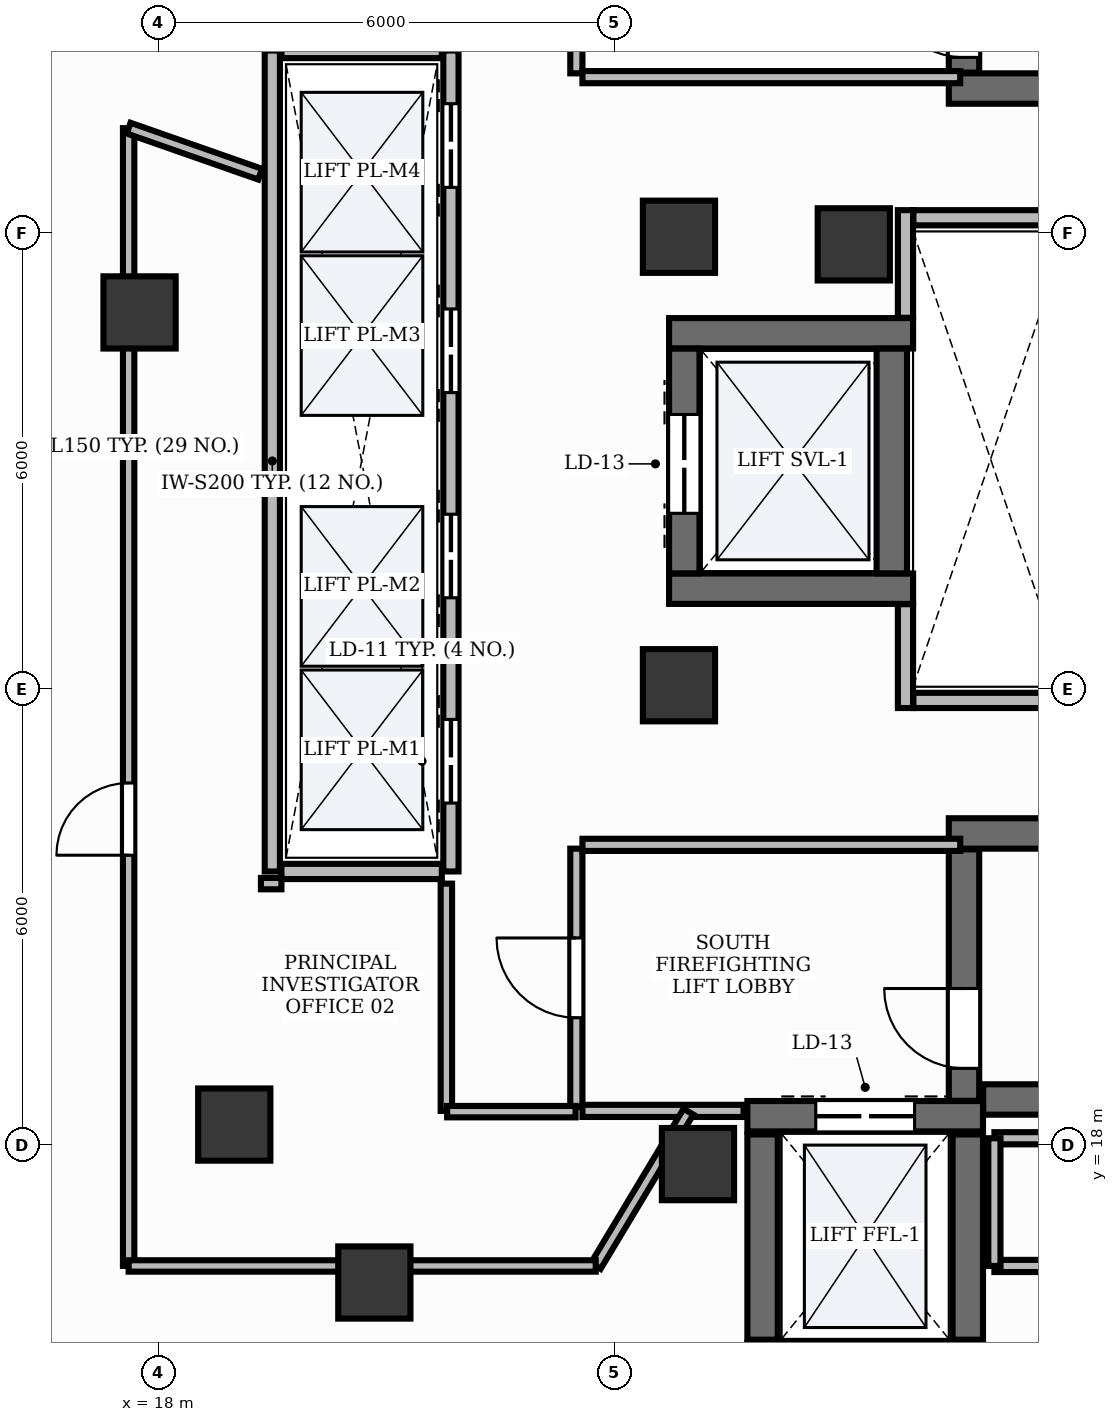
"""IFC4 building model, lengths in metres.
Left out: names, types, materials, properties, quantities, classifications, styles, units other than length and angle.
Written with IfcOpenShell. Run it as: python <this file> out.ifc"""

import sys

from ifc_helpers import new_model, si_unit, direction, frame, frame_2d, origin, origin_2d, place, context, subcontext, project, spatial, rectangle, extrude, element, fill, save


model = new_model("IFC4")
c1 = context("Model", 3, precision=1e-05, world=origin(), true_north=direction((0.0, 1.0)))
c2 = subcontext(c1, "Body", "Model", "MODEL_VIEW")
j1 = project(units=[si_unit("LENGTHUNIT", "METRE"), si_unit("PLANEANGLEUNIT", "RADIAN")], contexts=[c1])
p1 = place(None, origin())
s1 = spatial("IfcSite", under=j1, at=p1, CompositionType="ELEMENT")
p2 = place(p1, origin())
s2 = spatial("IfcBuilding", under=s1, at=p2, CompositionType="ELEMENT")
p3 = place(p2, frame((0.0, 0.0, 196.2)))
s3 = spatial("IfcBuildingStorey", under=s2, at=p3, CompositionType="ELEMENT", Elevation=196.2)
p4 = place(p3, frame((28.4, 31.9, 0.0), z_axis=(0.0, 0.0, 1.0), x_axis=(1.0, 0.0, 0.0)))
e1 = element("IfcWall", 1, at=p4, inside=s3, PredefinedType="SHEAR", context=c2, shape_type="SweptSolid", body=[
    extrude(rectangle(XDim=8.65, YDim=0.4, at=frame_2d((4.325, 0.0))), origin(), (0.0, 0.0, 1.0), 3.9),
])
p5 = place(p3, frame((28.6, 32.11, 0.0), z_axis=(0.0, 0.0, 1.0), x_axis=(0.0, 1.0, 0.0)))
e2 = element("IfcWall", 2, at=p5, inside=s3, PredefinedType="SHEAR", context=c2, shape_type="SweptSolid", body=[
    extrude(rectangle(XDim=3.308, YDim=0.4, at=frame_2d((1.654, 0.0))), origin(), (0.0, 0.0, 1.0), 3.9),
])
p6 = place(p5, frame((0.2, 0.0, 0.0)))
e3 = element("IfcOpeningElement", 3, at=p6, cuts=e2, PredefinedType="OPENING", context=c2, shape_type="SweptSolid", body=[
    extrude(rectangle(XDim=1.05, YDim=2.15, at=frame_2d((0.525, 1.075))), frame((0.0, 0.215, 0.0), z_axis=(0.0, -1.0, 0.0), x_axis=(1.0, 0.0, 0.0)), (0.0, 0.0, 1.0), 0.43),
])
p7 = place(p3, frame((28.852, 18.6, 0.0), z_axis=(0.0, 0.0, 1.0), x_axis=(1.0, 0.0, 0.0)))
e4 = element("IfcWall", 4, at=p7, inside=s3, PredefinedType="SHEAR", context=c2, shape_type="SweptSolid", body=[
    extrude(rectangle(XDim=8.198, YDim=0.4, at=frame_2d((4.099, 0.0))), origin(), (0.0, 0.0, 1.0), 3.9),
])
p8 = place(p3, frame((28.4, 22.1, 0.0), z_axis=(0.0, 0.0, 1.0), x_axis=(1.0, 0.0, 0.0)))
e5 = element("IfcWall", 5, at=p8, inside=s3, PredefinedType="SHEAR", context=c2, shape_type="SweptSolid", body=[
    extrude(rectangle(XDim=8.65, YDim=0.4, at=frame_2d((4.325, 0.0))), origin(), (0.0, 0.0, 1.0), 3.9),
])
p9 = place(p3, frame((28.6, 18.582, 0.0), z_axis=(0.0, 0.0, 1.0), x_axis=(0.0, 1.0, 0.0)))
e6 = element("IfcWall", 6, at=p9, inside=s3, PredefinedType="SHEAR", context=c2, shape_type="SweptSolid", body=[
    extrude(rectangle(XDim=3.308, YDim=0.4, at=frame_2d((1.654, 0.0))), origin(), (0.0, 0.0, 1.0), 3.9),
])
p10 = place(p9, frame((0.428, 0.0, 0.0)))
e7 = element("IfcOpeningElement", 7, at=p10, cuts=e6, PredefinedType="OPENING", context=c2, shape_type="SweptSolid", body=[
    extrude(rectangle(XDim=1.05, YDim=2.15, at=frame_2d((0.525, 1.075))), frame((0.0, 0.215, 0.0), z_axis=(0.0, -1.0, 0.0), x_axis=(1.0, 0.0, 0.0)), (0.0, 0.0, 1.0), 0.43),
])
p11 = place(p3, frame((25.75, 18.38, 0.0), z_axis=(0.0, 0.0, 1.0), x_axis=(1.0, 0.0, 0.0)))
e8 = element("IfcWall", 8, at=p11, inside=s3, PredefinedType="SHEAR", context=c2, shape_type="SweptSolid", body=[
    extrude(rectangle(XDim=3.1, YDim=0.4, at=frame_2d((1.55, 0.0))), origin(), (0.0, 0.0, 1.0), 3.9),
])
p12 = place(p11, frame((0.9, 0.0, 0.0)))
e9 = element("IfcOpeningElement", 9, at=p12, cuts=e8, PredefinedType="OPENING", context=c2, shape_type="SweptSolid", body=[
    extrude(rectangle(XDim=1.3, YDim=2.2, at=frame_2d((0.65, 1.1))), frame((0.0, 0.215, 0.0), z_axis=(0.0, -1.0, 0.0), x_axis=(1.0, 0.0, 0.0)), (0.0, 0.0, 1.0), 0.43),
])
for number, where, z_axis, x_axis in (
    (10, (25.95, 15.44, 0.0), (0.0, 0.0, 1.0), (0.0, 1.0, 0.0)),
    (11, (28.65, 15.44, 0.0), (0.0, 0.0, 1.0), (0.0, 1.0, 0.0)),
):
    element("IfcWall", number, at=place(p3, frame(where, z_axis=z_axis, x_axis=x_axis)), inside=s3, PredefinedType="SHEAR", context=c2, shape_type="SweptSolid", body=[
        extrude(rectangle(XDim=2.7, YDim=0.4, at=frame_2d((1.35, 0.0))), origin(), (0.0, 0.0, 1.0), 3.9),
    ])
for number, where, z_axis, x_axis in (
    (12, (24.72, 28.68, 0.0), (0.0, 0.0, 1.0), (1.0, 0.0, 0.0)),
    (13, (24.72, 25.32, 0.0), (0.0, 0.0, 1.0), (1.0, 0.0, 0.0)),
):
    element("IfcWall", number, at=place(p3, frame(where, z_axis=z_axis, x_axis=x_axis)), inside=s3, PredefinedType="SHEAR", context=c2, shape_type="SweptSolid", body=[
        extrude(rectangle(XDim=3.21, YDim=0.4, at=frame_2d((1.605, 0.0))), origin(), (0.0, 0.0, 1.0), 3.9),
    ])
p13 = place(p3, frame((24.92, 25.522, 0.0), z_axis=(0.0, 0.0, 1.0), x_axis=(0.0, 1.0, 0.0)))
e14 = element("IfcWall", 14, at=p13, inside=s3, PredefinedType="SHEAR", context=c2, shape_type="SweptSolid", body=[
    extrude(rectangle(XDim=2.956, YDim=0.4, at=frame_2d((1.478, 0.0))), origin(), (0.0, 0.0, 1.0), 3.9),
])
p14 = place(p13, frame((0.79, 0.0, 0.0)))
e15 = element("IfcOpeningElement", 15, at=p14, cuts=e14, PredefinedType="OPENING", context=c2, shape_type="SweptSolid", body=[
    extrude(rectangle(XDim=1.3, YDim=2.2, at=frame_2d((0.65, 1.1))), frame((0.0, 0.215, 0.0), z_axis=(0.0, -1.0, 0.0), x_axis=(1.0, 0.0, 0.0)), (0.0, 0.0, 1.0), 0.43),
])
p15 = place(p3, frame((27.65, 25.522, 0.0), z_axis=(0.0, 0.0, 1.0), x_axis=(0.0, 1.0, 0.0)))
e16 = element("IfcWall", 16, at=p15, inside=s3, PredefinedType="SHEAR", context=c2, shape_type="SweptSolid", body=[
    extrude(rectangle(XDim=2.956, YDim=0.4, at=frame_2d((1.478, 0.0))), origin(), (0.0, 0.0, 1.0), 3.9),
])
for number, where, z_axis, x_axis in (
    (17, (24.85, 29.95, -0.0), (0.0, 0.0, 1.0), (1.0, 0.0, 0.0)),
    (18, (27.15, 29.85, -0.0), (0.0, 0.0, 1.0), (1.0, 0.0, 0.0)),
    (19, (24.85, 24.05, -0.0), (0.0, 0.0, 1.0), (1.0, 0.0, 0.0)),
    (20, (25.1, 17.75, -0.0), (0.0, 0.0, 1.0), (1.0, 0.0, 0.0)),
):
    element("IfcColumn", number, at=place(p3, frame(where, z_axis=z_axis, x_axis=x_axis)), inside=s3, PredefinedType="PILASTER", context=c2, shape_type="SweptSolid", body=[
        extrude(rectangle(XDim=0.95, YDim=0.95, at=origin_2d()), origin(), (0.0, 0.0, 1.0), 3.901),
    ])
for number, where, z_axis, x_axis in (
    (21, (17.753, 28.955, -0.0), (0.0, 0.0, 1.0), (1.0, 0.0, 0.0)),
    (22, (19.0, 18.27, -0.0), (0.0, 0.0, 1.0), (1.0, 0.0, 0.0)),
    (23, (20.842, 16.192, -0.0), (0.0, 0.0, 1.0), (1.0, 0.0, 0.0)),
):
    element("IfcColumn", number, at=place(p3, frame(where, z_axis=z_axis, x_axis=x_axis)), inside=s3, PredefinedType="COLUMN", context=c2, shape_type="SweptSolid", body=[
        extrude(rectangle(XDim=0.95, YDim=0.95, at=origin_2d()), origin(), (0.0, 0.0, 1.0), 3.901),
    ])
p16 = place(p3, frame((19.5, 21.6, 0.0), z_axis=(0.0, 0.0, 1.0), x_axis=(0.0, 1.0, 0.0)))
e24 = element("IfcWall", 24, at=p16, inside=s3, PredefinedType="PARTITIONING", context=c2, shape_type="SweptSolid", body=[
    extrude(rectangle(XDim=10.8, YDim=0.2, at=frame_2d((5.4, 0.0))), origin(), (0.0, 0.0, 1.0), 2.22),
])
p17 = place(p3, frame((21.85, 21.6, 0.0), z_axis=(0.0, 0.0, 1.0), x_axis=(0.0, 1.0, 0.0)))
e25 = element("IfcWall", 25, at=p17, inside=s3, PredefinedType="PARTITIONING", context=c2, shape_type="SweptSolid", body=[
    extrude(rectangle(XDim=10.8, YDim=0.2, at=frame_2d((5.4, 0.0))), origin(), (0.0, 0.0, 1.0), 2.22),
])
p18 = place(p17, frame((0.9, 0.0, 0.0)))
e26 = element("IfcOpeningElement", 26, at=p18, cuts=e25, PredefinedType="OPENING", context=c2, shape_type="SweptSolid", body=[
    extrude(rectangle(XDim=1.1, YDim=2.2, at=frame_2d((0.55, 1.1))), frame((0.0, 0.115, 0.0), z_axis=(0.0, -1.0, 0.0), x_axis=(1.0, 0.0, 0.0)), (0.0, 0.0, 1.0), 0.23),
])
p19 = place(p17, frame((3.6, 0.0, 0.0)))
e27 = element("IfcOpeningElement", 27, at=p19, cuts=e25, PredefinedType="OPENING", context=c2, shape_type="SweptSolid", body=[
    extrude(rectangle(XDim=1.1, YDim=2.2, at=frame_2d((0.55, 1.1))), frame((0.0, 0.115, 0.0), z_axis=(0.0, -1.0, 0.0), x_axis=(1.0, 0.0, 0.0)), (0.0, 0.0, 1.0), 0.23),
])
p20 = place(p17, frame((6.3, 0.0, 0.0)))
e28 = element("IfcOpeningElement", 28, at=p20, cuts=e25, PredefinedType="OPENING", context=c2, shape_type="SweptSolid", body=[
    extrude(rectangle(XDim=1.1, YDim=2.2, at=frame_2d((0.55, 1.1))), frame((0.0, 0.115, 0.0), z_axis=(0.0, -1.0, 0.0), x_axis=(1.0, 0.0, 0.0)), (0.0, 0.0, 1.0), 0.23),
])
p21 = place(p17, frame((9.0, 0.0, 0.0)))
e29 = element("IfcOpeningElement", 29, at=p21, cuts=e25, PredefinedType="OPENING", context=c2, shape_type="SweptSolid", body=[
    extrude(rectangle(XDim=1.1, YDim=2.2, at=frame_2d((0.55, 1.1))), frame((0.0, 0.115, 0.0), z_axis=(0.0, -1.0, 0.0), x_axis=(1.0, 0.0, 0.0)), (0.0, 0.0, 1.0), 0.23),
])
for number, where, z_axis, x_axis in (
    (30, (19.62, 21.6, 0.0), (0.0, 0.0, 1.0), (1.0, 0.0, 0.0)),
    (31, (19.62, 32.4, 0.0), (0.0, 0.0, 1.0), (1.0, 0.0, 0.0)),
):
    element("IfcWall", number, at=place(p3, frame(where, z_axis=z_axis, x_axis=x_axis)), inside=s3, PredefinedType="PARTITIONING", context=c2, shape_type="SweptSolid", body=[
        extrude(rectangle(XDim=2.11, YDim=0.2, at=frame_2d((1.055, 0.0))), origin(), (0.0, 0.0, 1.0), 2.22),
    ])
p22 = place(p3, frame((27.83, 23.75, 0.0), z_axis=(0.0, 0.0, 1.0), x_axis=(0.0, 1.0, 0.0)))
e32 = element("IfcWall", 32, at=p22, inside=s3, PredefinedType="PARTITIONING", context=c2, shape_type="SweptSolid", body=[
    extrude(rectangle(XDim=1.366, YDim=0.2, at=frame_2d((0.683, 0.0))), origin(), (0.0, 0.0, 1.0), 2.22),
])
p23 = place(p3, frame((27.83, 28.884, 0.0), z_axis=(0.0, 0.0, 1.0), x_axis=(0.0, 1.0, 0.0)))
e33 = element("IfcWall", 33, at=p23, inside=s3, PredefinedType="PARTITIONING", context=c2, shape_type="SweptSolid", body=[
    extrude(rectangle(XDim=1.416, YDim=0.2, at=frame_2d((0.708, 0.0))), origin(), (0.0, 0.0, 1.0), 2.22),
])
for number, where, z_axis, x_axis in (
    (34, (27.934, 23.85, 0.0), (0.0, 0.0, 1.0), (1.0, 0.0, 0.0)),
    (35, (27.934, 30.2, 0.0), (0.0, 0.0, 1.0), (1.0, 0.0, 0.0)),
):
    element("IfcWall", number, at=place(p3, frame(where, z_axis=z_axis, x_axis=x_axis)), inside=s3, PredefinedType="PARTITIONING", context=c2, shape_type="SweptSolid", body=[
        extrude(rectangle(XDim=2.096, YDim=0.2, at=frame_2d((1.048, 0.0))), origin(), (0.0, 0.0, 1.0), 2.22),
    ])
p24 = place(p3, frame((23.5, 32.1, 0.0), z_axis=(0.0, 0.0, 1.0), x_axis=(0.0, 1.0, 0.0)))
e36 = element("IfcWall", 36, at=p24, inside=s3, PredefinedType="PARTITIONING", context=c2, shape_type="SweptSolid", body=[
    extrude(rectangle(XDim=3.4, YDim=0.16, at=frame_2d((1.7, 0.0))), origin(), (0.0, 0.0, 1.0), 2.22),
])
p25 = place(p24, frame((1.175, 0.0, 0.0)))
e37 = element("IfcOpeningElement", 37, at=p25, cuts=e36, PredefinedType="OPENING", context=c2, shape_type="SweptSolid", body=[
    extrude(rectangle(XDim=1.05, YDim=2.15, at=frame_2d((0.525, 1.075))), frame((0.0, 0.095, 0.0), z_axis=(0.0, -1.0, 0.0), x_axis=(1.0, 0.0, 0.0)), (0.0, 0.0, 1.0), 0.19),
])
p26 = place(p3, frame((23.5, 18.5, 0.0), z_axis=(0.0, 0.0, 1.0), x_axis=(0.0, 1.0, 0.0)))
e38 = element("IfcWall", 38, at=p26, inside=s3, PredefinedType="PARTITIONING", context=c2, shape_type="SweptSolid", body=[
    extrude(rectangle(XDim=3.4, YDim=0.16, at=frame_2d((1.7, 0.0))), origin(), (0.0, 0.0, 1.0), 2.22),
])
p27 = place(p26, frame((1.175, 0.0, 0.0)))
e39 = element("IfcOpeningElement", 39, at=p27, cuts=e38, PredefinedType="OPENING", context=c2, shape_type="SweptSolid", body=[
    extrude(rectangle(XDim=1.05, YDim=2.15, at=frame_2d((0.525, 1.075))), frame((0.0, 0.095, 0.0), z_axis=(0.0, -1.0, 0.0), x_axis=(1.0, 0.0, 0.0)), (0.0, 0.0, 1.0), 0.19),
])
for number, where, z_axis, x_axis in (
    (40, (23.58, 32.05, 0.0), (0.0, 0.0, 1.0), (1.0, 0.0, 0.0)),
    (41, (23.58, 21.95, 0.0), (0.0, 0.0, 1.0), (1.0, 0.0, 0.0)),
):
    element("IfcWall", number, at=place(p3, frame(where, z_axis=z_axis, x_axis=x_axis)), inside=s3, PredefinedType="PARTITIONING", context=c2, shape_type="SweptSolid", body=[
        extrude(rectangle(XDim=4.97, YDim=0.16, at=frame_2d((2.485, 0.0))), origin(), (0.0, 0.0, 1.0), 2.22),
    ])
p28 = place(p3, frame((23.58, 18.45, 0.0), z_axis=(0.0, 0.0, 1.0), x_axis=(1.0, 0.0, 0.0)))
e42 = element("IfcWall", 42, at=p28, inside=s3, PredefinedType="PARTITIONING", context=c2, shape_type="SweptSolid", body=[
    extrude(rectangle(XDim=2.12, YDim=0.16, at=frame_2d((1.06, 0.0))), origin(), (0.0, 0.0, 1.0), 2.22),
])
p29 = place(p3, frame((17.61, 16.41, 0.0), z_axis=(0.0, 0.0, 1.0), x_axis=(0.0, 1.0, 0.0)))
e43 = element("IfcWall", 43, at=p29, inside=s3, PredefinedType="PARTITIONING", context=c2, shape_type="SweptSolid", body=[
    extrude(rectangle(XDim=14.969, YDim=0.15, at=frame_2d((7.484, 0.0))), origin(), (0.0, 0.0, 1.0), 2.22),
])
p30 = place(p29, frame((5.404, 0.0, 0.0)))
e44 = element("IfcOpeningElement", 44, at=p30, cuts=e43, PredefinedType="OPENING", context=c2, shape_type="SweptSolid", body=[
    extrude(rectangle(XDim=0.95, YDim=2.15, at=frame_2d((0.475, 1.075))), frame((0.0, 0.09, 0.0), z_axis=(0.0, -1.0, 0.0), x_axis=(1.0, 0.0, 0.0)), (0.0, 0.0, 1.0), 0.18),
])
p31 = place(p3, frame((40.342, 16.41, 0.0), z_axis=(0.0, 0.0, 1.0), x_axis=(-1.0, 0.0, 0.0)))
e45 = element("IfcWall", 45, at=p31, inside=s3, PredefinedType="PARTITIONING", context=c2, shape_type="SweptSolid", body=[
    extrude(rectangle(XDim=11.342, YDim=0.16, at=frame_2d((5.671, 0.0))), origin(), (0.0, 0.0, 1.0), 2.22),
])
p32 = place(p31, frame((6.14, 0.0, 0.0)))
e46 = element("IfcOpeningElement", 46, at=p32, cuts=e45, PredefinedType="OPENING", context=c2, shape_type="SweptSolid", body=[
    extrude(rectangle(XDim=0.95, YDim=2.15, at=frame_2d((0.475, 1.075))), frame((0.0, 0.095, 0.0), z_axis=(0.0, -1.0, 0.0), x_axis=(1.0, 0.0, 0.0)), (0.0, 0.0, 1.0), 0.19),
])
p33 = place(p3, frame((19.35, 21.44, 0.0), z_axis=(0.0, 0.0, 1.0), x_axis=(1.0, 0.0, 0.0)))
e47 = element("IfcWall", 47, at=p33, inside=s3, PredefinedType="PARTITIONING", context=c2, shape_type="SweptSolid", body=[
    extrude(rectangle(XDim=0.27, YDim=0.15, at=frame_2d((0.135, 0.0))), origin(), (0.0, 0.0, 1.0), 2.22),
])
p34 = place(p3, frame((21.79, 21.44, 0.0), z_axis=(0.0, 0.0, 1.0), x_axis=(0.0, -1.0, 0.0)))
e48 = element("IfcWall", 48, at=p34, inside=s3, PredefinedType="PARTITIONING", context=c2, shape_type="SweptSolid", body=[
    extrude(rectangle(XDim=2.99, YDim=0.15, at=frame_2d((1.495, 0.0))), origin(), (0.0, 0.0, 1.0), 2.22),
])
p35 = place(p3, frame((21.8, 18.44, 0.0), z_axis=(0.0, 0.0, 1.0), x_axis=(1.0, 0.0, 0.0)))
e49 = element("IfcWall", 49, at=p35, inside=s3, PredefinedType="PARTITIONING", context=c2, shape_type="SweptSolid", body=[
    extrude(rectangle(XDim=1.69, YDim=0.15, at=frame_2d((0.845, 0.0))), origin(), (0.0, 0.0, 1.0), 2.22),
])
p36 = place(p3, frame((24.975, 18.44, 0.0), z_axis=(0.0, 0.0, 1.0), x_axis=(-0.515026255496, -0.857174402412, 0.0)))
e50 = element("IfcWall", 50, at=p36, inside=s3, PredefinedType="PARTITIONING", context=c2, shape_type="SweptSolid", body=[
    extrude(rectangle(XDim=2.368, YDim=0.15, at=frame_2d((1.184, 0.0))), origin(), (0.0, 0.0, 1.0), 2.22),
])
p37 = place(p3, frame((23.755, 16.41, 0.0), z_axis=(0.0, 0.0, 1.0), x_axis=(-1.0, 0.0, 0.0)))
e51 = element("IfcWall", 51, at=p37, inside=s3, PredefinedType="PARTITIONING", context=c2, shape_type="SweptSolid", body=[
    extrude(rectangle(XDim=6.145, YDim=0.15, at=frame_2d((3.072, 0.0))), origin(), (0.0, 0.0, 1.0), 2.22),
])
p38 = place(p3, frame((17.61, 31.379, 0.0), z_axis=(0.0, 0.0, 1.0), x_axis=(0.943806424697, -0.330498763539, 0.0)))
e52 = element("IfcWall", 52, at=p38, inside=s3, PredefinedType="PARTITIONING", context=c2, shape_type="SweptSolid", body=[
    extrude(rectangle(XDim=1.833, YDim=0.15, at=frame_2d((0.917, 0.0))), origin(), (0.0, 0.0, 1.0), 2.22),
])
p39 = place(p3, frame((29.0, 18.09, 0.0), z_axis=(0.0, 0.0, 1.0), x_axis=(1.0, 0.0, 0.0)))
e53 = element("IfcWall", 53, at=p39, inside=s3, PredefinedType="PARTITIONING", context=c2, shape_type="SweptSolid", body=[
    extrude(rectangle(XDim=8.35, YDim=0.16, at=frame_2d((4.175, 0.0))), origin(), (0.0, 0.0, 1.0), 2.22),
])
p40 = place(p3, frame((29.0, 16.41, 0.0), z_axis=(0.0, 0.0, 1.0), x_axis=(0.0, 1.0, 0.0)))
e54 = element("IfcWall", 54, at=p40, inside=s3, PredefinedType="PARTITIONING", context=c2, shape_type="SweptSolid", body=[
    extrude(rectangle(XDim=1.68, YDim=0.16, at=frame_2d((0.84, 0.0))), origin(), (0.0, 0.0, 1.0), 2.22),
])
p41 = place(p6, origin())
e55 = element("IfcDoor", 55, at=p41, inside=s3, OperationType="SINGLE_SWING_RIGHT", PredefinedType="DOOR", context=c2, shape_type="SweptSolid", body=[
    extrude(rectangle(XDim=1.05, YDim=2.15, at=frame_2d((0.525, 1.075))), frame((0.0, 0.025, 0.0), z_axis=(0.0, -1.0, 0.0), x_axis=(1.0, 0.0, 0.0)), (0.0, 0.0, 1.0), 0.05),
])
fill(e3, e55)
p42 = place(p10, origin())
e56 = element("IfcDoor", 56, at=p42, inside=s3, OperationType="SINGLE_SWING_RIGHT", PredefinedType="DOOR", context=c2, shape_type="SweptSolid", body=[
    extrude(rectangle(XDim=1.05, YDim=2.15, at=frame_2d((0.525, 1.075))), frame((0.0, 0.025, 0.0), z_axis=(0.0, -1.0, 0.0), x_axis=(1.0, 0.0, 0.0)), (0.0, 0.0, 1.0), 0.05),
])
fill(e7, e56)
p43 = place(p18, origin())
e57 = element("IfcDoor", 57, at=p43, inside=s3, OperationType="DOUBLE_DOOR_SLIDING", PredefinedType="DOOR", context=c2, shape_type="SweptSolid", body=[
    extrude(rectangle(XDim=1.1, YDim=2.2, at=frame_2d((0.55, 1.1))), frame((0.0, 0.025, 0.0), z_axis=(0.0, -1.0, 0.0), x_axis=(1.0, 0.0, 0.0)), (0.0, 0.0, 1.0), 0.05),
])
fill(e26, e57)
p44 = place(p19, origin())
e58 = element("IfcDoor", 58, at=p44, inside=s3, OperationType="DOUBLE_DOOR_SLIDING", PredefinedType="DOOR", context=c2, shape_type="SweptSolid", body=[
    extrude(rectangle(XDim=1.1, YDim=2.2, at=frame_2d((0.55, 1.1))), frame((0.0, 0.025, 0.0), z_axis=(0.0, -1.0, 0.0), x_axis=(1.0, 0.0, 0.0)), (0.0, 0.0, 1.0), 0.05),
])
fill(e27, e58)
p45 = place(p20, origin())
e59 = element("IfcDoor", 59, at=p45, inside=s3, OperationType="DOUBLE_DOOR_SLIDING", PredefinedType="DOOR", context=c2, shape_type="SweptSolid", body=[
    extrude(rectangle(XDim=1.1, YDim=2.2, at=frame_2d((0.55, 1.1))), frame((0.0, 0.025, 0.0), z_axis=(0.0, -1.0, 0.0), x_axis=(1.0, 0.0, 0.0)), (0.0, 0.0, 1.0), 0.05),
])
fill(e28, e59)
p46 = place(p21, origin())
e60 = element("IfcDoor", 60, at=p46, inside=s3, OperationType="DOUBLE_DOOR_SLIDING", PredefinedType="DOOR", context=c2, shape_type="SweptSolid", body=[
    extrude(rectangle(XDim=1.1, YDim=2.2, at=frame_2d((0.55, 1.1))), frame((0.0, 0.025, 0.0), z_axis=(0.0, -1.0, 0.0), x_axis=(1.0, 0.0, 0.0)), (0.0, 0.0, 1.0), 0.05),
])
fill(e29, e60)
p47 = place(p12, origin())
e61 = element("IfcDoor", 61, at=p47, inside=s3, OperationType="DOUBLE_DOOR_SLIDING", PredefinedType="DOOR", context=c2, shape_type="SweptSolid", body=[
    extrude(rectangle(XDim=1.3, YDim=2.2, at=frame_2d((0.65, 1.1))), frame((0.0, 0.025, 0.0), z_axis=(0.0, -1.0, 0.0), x_axis=(1.0, 0.0, 0.0)), (0.0, 0.0, 1.0), 0.05),
])
fill(e9, e61)
p48 = place(p14, origin())
e62 = element("IfcDoor", 62, at=p48, inside=s3, OperationType="DOUBLE_DOOR_SLIDING", PredefinedType="DOOR", context=c2, shape_type="SweptSolid", body=[
    extrude(rectangle(XDim=1.3, YDim=2.2, at=frame_2d((0.65, 1.1))), frame((0.0, 0.025, 0.0), z_axis=(0.0, -1.0, 0.0), x_axis=(1.0, 0.0, 0.0)), (0.0, 0.0, 1.0), 0.05),
])
fill(e15, e62)
p49 = place(p27, origin())
e63 = element("IfcDoor", 63, at=p49, inside=s3, OperationType="SINGLE_SWING_RIGHT", PredefinedType="DOOR", context=c2, shape_type="SweptSolid", body=[
    extrude(rectangle(XDim=1.05, YDim=2.15, at=frame_2d((0.525, 1.075))), frame((0.0, 0.025, 0.0), z_axis=(0.0, -1.0, 0.0), x_axis=(1.0, 0.0, 0.0)), (0.0, 0.0, 1.0), 0.05),
])
fill(e39, e63)
p50 = place(p30, origin())
e64 = element("IfcDoor", 64, at=p50, inside=s3, OperationType="SINGLE_SWING_LEFT", PredefinedType="DOOR", context=c2, shape_type="SweptSolid", body=[
    extrude(rectangle(XDim=0.95, YDim=2.15, at=frame_2d((0.475, 1.075))), frame((0.0, 0.025, 0.0), z_axis=(0.0, -1.0, 0.0), x_axis=(1.0, 0.0, 0.0)), (0.0, 0.0, 1.0), 0.05),
])
fill(e44, e64)
save(model, sys.argv[1])
